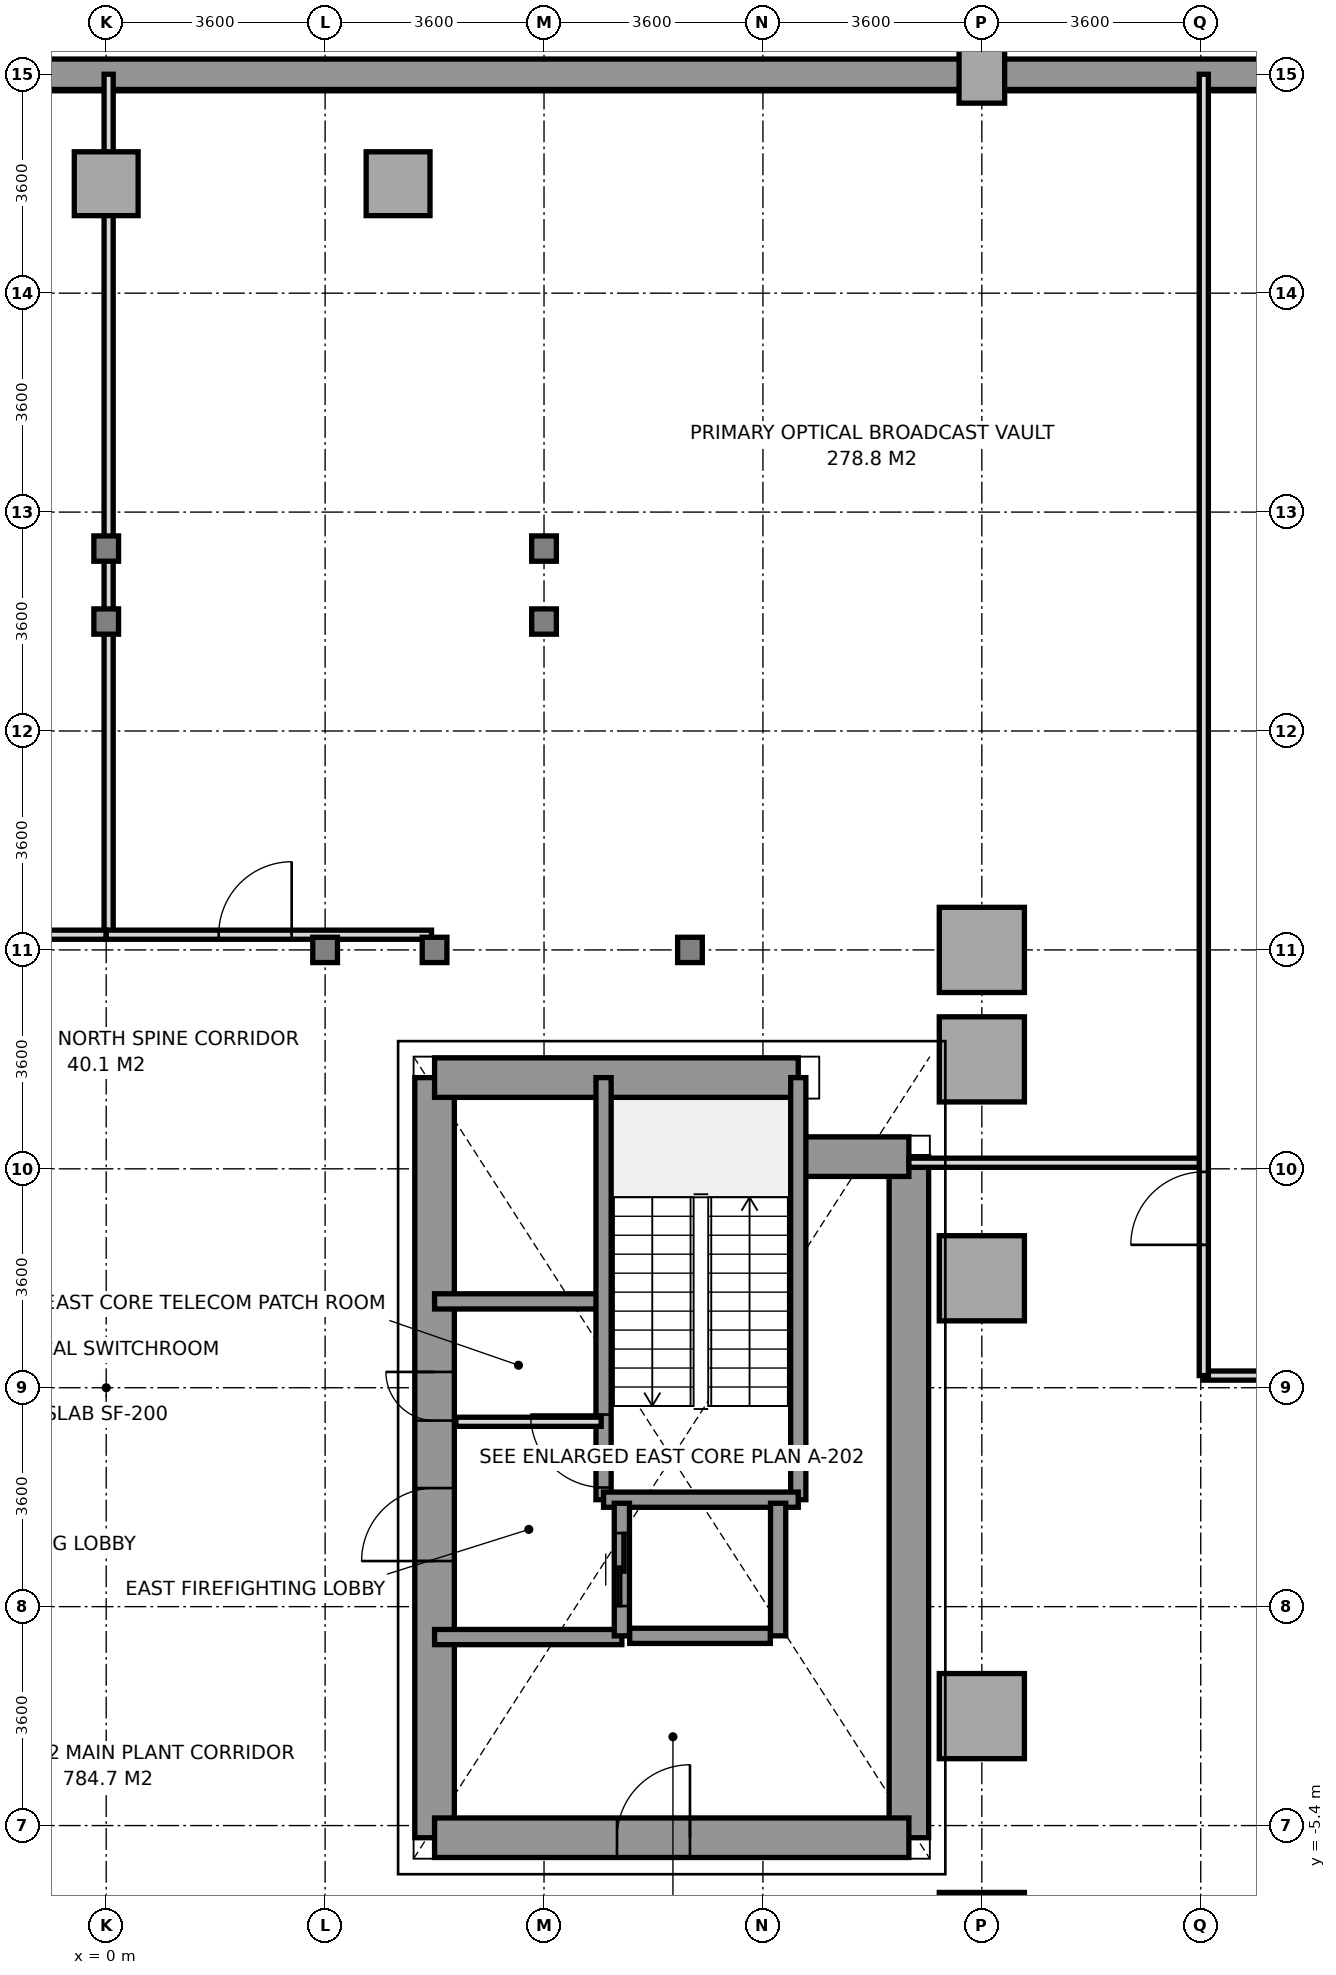
"""IFC4 building model, lengths in metres.
Left out: names, types, materials, properties, quantities, classifications, styles, units other than length and angle.
Written with IfcOpenShell. Run it as: python <this file> out.ifc"""

import sys

from ifc_helpers import new_model, si_unit, direction, frame, frame_2d, origin, origin_2d, place, context, subcontext, project, spatial, rectangle, i_section, extrude, source, transform, mapped, element, fill, save


model = new_model("IFC4")
c1 = context("Model", 3, precision=1e-05, world=origin(), true_north=direction((0.0, 1.0)))
c2 = subcontext(c1, "Body", "Model", "MODEL_VIEW")
j1 = project(units=[si_unit("LENGTHUNIT", "METRE"), si_unit("PLANEANGLEUNIT", "RADIAN")], contexts=[c1])
p1 = place(None, origin())
s1 = spatial("IfcSite", under=j1, at=p1, CompositionType="ELEMENT")
p2 = place(p1, origin())
s2 = spatial("IfcBuilding", under=s1, at=p2, CompositionType="ELEMENT")
p3 = place(p2, frame((0.0, 0.0, -8.4)))
s3 = spatial("IfcBuildingStorey", under=s2, at=p3, CompositionType="ELEMENT", Elevation=-8.4)
m1 = source(origin(), c2, "Body", "SweptSolid", [
    extrude(i_section(OverallWidth=0.406, OverallDepth=0.416, WebThickness=0.024, FlangeThickness=0.039, at=origin_2d()), origin(), (0.0, 0.0, 1.0), 4.12),
])
for number, where, z_axis, x_axis in (
    (1, (0.0, 14.4, -0.2), (0.0, 0.0, 1.0), (1.0, 0.0, 0.0)),
    (2, (0.0, 15.6, -0.2), (0.0, 0.0, 1.0), (1.0, 0.0, 0.0)),
):
    element("IfcColumn", number, at=place(p3, frame(where, z_axis=z_axis, x_axis=x_axis)), inside=s3, PredefinedType="COLUMN", context=c2, shape_type="MappedRepresentation", body=[
        mapped(m1, transform((0.0, 0.0, 0.0), x_axis=(1.0, 0.0, 0.0), y_axis=(0.0, 1.0, 0.0), z_axis=(0.0, 0.0, 1.0), scale=1.0)),
    ])
m2 = source(origin(), c2, "Body", "SweptSolid", [
    extrude(rectangle(XDim=1.05, YDim=1.05, at=origin_2d()), origin(), (0.0, 0.0, 1.0), 4.12),
])
p4 = place(p3, frame((0.0, 21.6, -0.2), z_axis=(0.0, 0.0, 1.0), x_axis=(1.0, 0.0, 0.0)))
e3 = element("IfcColumn", 3, at=p4, inside=s3, PredefinedType="COLUMN", context=c2, shape_type="MappedRepresentation", body=[
    mapped(m2, transform((0.0, 0.0, 0.0), x_axis=(1.0, 0.0, 0.0), y_axis=(0.0, 1.0, 0.0), z_axis=(0.0, 0.0, 1.0), scale=1.0)),
])
p5 = place(p3, frame((3.6, 9.0, -0.2), z_axis=(0.0, 0.0, 1.0), x_axis=(1.0, 0.0, 0.0)))
e4 = element("IfcColumn", 4, at=p5, inside=s3, PredefinedType="COLUMN", context=c2, shape_type="MappedRepresentation", body=[
    mapped(m1, transform((0.0, 0.0, 0.0), x_axis=(1.0, 0.0, 0.0), y_axis=(0.0, 1.0, 0.0), z_axis=(0.0, 0.0, 1.0), scale=1.0)),
])
p6 = place(p3, frame((4.8, 21.6, -0.2), z_axis=(0.0, 0.0, 1.0), x_axis=(1.0, 0.0, 0.0)))
e5 = element("IfcColumn", 5, at=p6, inside=s3, PredefinedType="COLUMN", context=c2, shape_type="MappedRepresentation", body=[
    mapped(m2, transform((0.0, 0.0, 0.0), x_axis=(1.0, 0.0, 0.0), y_axis=(0.0, 1.0, 0.0), z_axis=(0.0, 0.0, 1.0), scale=1.0)),
])
for number, where, z_axis, x_axis in (
    (6, (5.4, 9.0, -0.2), (0.0, 0.0, 1.0), (1.0, 0.0, 0.0)),
    (7, (7.2, 14.4, -0.2), (0.0, 0.0, 1.0), (1.0, 0.0, 0.0)),
    (8, (7.2, 15.6, -0.2), (0.0, 0.0, 1.0), (1.0, 0.0, 0.0)),
    (9, (9.6, 9.0, -0.2), (0.0, 0.0, 1.0), (1.0, 0.0, 0.0)),
):
    element("IfcColumn", number, at=place(p3, frame(where, z_axis=z_axis, x_axis=x_axis)), inside=s3, PredefinedType="COLUMN", context=c2, shape_type="MappedRepresentation", body=[
        mapped(m1, transform((0.0, 0.0, 0.0), x_axis=(1.0, 0.0, 0.0), y_axis=(0.0, 1.0, 0.0), z_axis=(0.0, 0.0, 1.0), scale=1.0)),
    ])
m3 = source(origin(), c2, "Body", "SweptSolid", [
    extrude(rectangle(XDim=1.4, YDim=1.4, at=origin_2d()), origin(), (0.0, 0.0, 1.0), 4.12),
])
for number, where, z_axis, x_axis in (
    (10, (14.4, -7.2, -0.2), (0.0, 0.0, 1.0), (1.0, 0.0, 0.0)),
    (11, (14.4, -3.6, -0.2), (0.0, 0.0, 1.0), (1.0, 0.0, 0.0)),
    (12, (14.4, 3.6, -0.2), (0.0, 0.0, 1.0), (1.0, 0.0, 0.0)),
    (13, (14.4, 7.2, -0.2), (0.0, 0.0, 1.0), (1.0, 0.0, 0.0)),
    (14, (14.4, 9.0, -0.2), (0.0, 0.0, 1.0), (1.0, 0.0, 0.0)),
):
    element("IfcColumn", number, at=place(p3, frame(where, z_axis=z_axis, x_axis=x_axis)), inside=s3, PredefinedType="COLUMN", context=c2, shape_type="MappedRepresentation", body=[
        mapped(m3, transform((0.0, 0.0, 0.0), x_axis=(1.0, 0.0, 0.0), y_axis=(0.0, 1.0, 0.0), z_axis=(0.0, 0.0, 1.0), scale=1.0)),
    ])
m4 = source(origin(), c2, "Body", "SweptSolid", [
    extrude(rectangle(XDim=0.75, YDim=0.95, at=origin_2d()), origin(), (0.0, 0.0, 1.0), 4.12),
])
p7 = place(p3, frame((14.4, 23.4, -0.2), z_axis=(0.0, 0.0, 1.0), x_axis=(1.0, 0.0, 0.0)))
e15 = element("IfcColumn", 15, at=p7, inside=s3, PredefinedType="COLUMN", context=c2, shape_type="MappedRepresentation", body=[
    mapped(m4, transform((0.0, 0.0, 0.0), x_axis=(1.0, 0.0, 0.0), y_axis=(0.0, 1.0, 0.0), z_axis=(0.0, 0.0, 1.0), scale=1.0)),
])
p8 = place(p3, frame((32.4, 23.4, -0.2), z_axis=(0.0, 0.0, 1.0), x_axis=(-1.0, 0.0, 0.0)))
e16 = element("IfcWall", 16, at=p8, inside=s3, PredefinedType="USERDEFINED", context=c2, shape_type="SweptSolid", body=[
    extrude(rectangle(XDim=64.8, YDim=0.5, at=frame_2d((32.4, 0.0))), origin(), (0.0, 0.0, 1.0), 4.12),
])
p9 = place(p3, frame((13.2, -5.6, -0.2), z_axis=(0.0, 0.0, 1.0), x_axis=(0.0, 1.0, 0.0)))
e17 = element("IfcWall", 17, at=p9, inside=s3, PredefinedType="SHEAR", context=c2, shape_type="SweptSolid", body=[
    extrude(rectangle(XDim=11.2, YDim=0.65, at=frame_2d((5.6, 0.0))), origin(), (0.0, 0.0, 1.0), 4.12),
])
p10 = place(p3, frame((5.4, -5.6, -0.2), z_axis=(0.0, 0.0, 1.0), x_axis=(0.0, 1.0, 0.0)))
e18 = element("IfcWall", 18, at=p10, inside=s3, PredefinedType="SHEAR", context=c2, shape_type="SweptSolid", body=[
    extrude(rectangle(XDim=12.5, YDim=0.65, at=frame_2d((6.25, 0.0))), origin(), (0.0, 0.0, 1.0), 4.12),
])
p11 = place(p10, frame((4.55, 0.0, 0.2)))
e19 = element("IfcOpeningElement", 19, at=p11, cuts=e18, PredefinedType="OPENING", context=c2, shape_type="SweptSolid", body=[
    extrude(rectangle(XDim=1.2, YDim=2.2, at=frame_2d((0.6, 1.1))), frame((0.0, 0.335, 0.0), z_axis=(0.0, -1.0, 0.0), x_axis=(1.0, 0.0, 0.0)), (0.0, 0.0, 1.0), 0.67),
])
p12 = place(p10, frame((6.86, 0.0, 0.2)))
e20 = element("IfcOpeningElement", 20, at=p12, cuts=e18, PredefinedType="OPENING", context=c2, shape_type="SweptSolid", body=[
    extrude(rectangle(XDim=0.8, YDim=2.1, at=frame_2d((0.4, 1.05))), frame((0.0, 0.335, 0.0), z_axis=(0.0, -1.0, 0.0), x_axis=(1.0, 0.0, 0.0)), (0.0, 0.0, 1.0), 0.67),
])
p13 = place(p3, frame((5.4, 6.9, -0.2), z_axis=(0.0, 0.0, 1.0), x_axis=(1.0, 0.0, 0.0)))
e21 = element("IfcWall", 21, at=p13, inside=s3, PredefinedType="SHEAR", context=c2, shape_type="SweptSolid", body=[
    extrude(rectangle(XDim=5.981, YDim=0.65, at=frame_2d((2.991, 0.0))), origin(), (0.0, 0.0, 1.0), 4.12),
])
p14 = place(p3, frame((11.381, 5.6, -0.2), z_axis=(0.0, 0.0, 1.0), x_axis=(1.0, 0.0, 0.0)))
e22 = element("IfcWall", 22, at=p14, inside=s3, PredefinedType="SHEAR", context=c2, shape_type="SweptSolid", body=[
    extrude(rectangle(XDim=1.819, YDim=0.65, at=frame_2d((0.909, 0.0))), origin(), (0.0, 0.0, 1.0), 4.12),
])
p15 = place(p3, frame((5.4, -5.6, -0.2), z_axis=(0.0, 0.0, 1.0), x_axis=(1.0, 0.0, 0.0)))
e23 = element("IfcWall", 23, at=p15, inside=s3, PredefinedType="SHEAR", context=c2, shape_type="SweptSolid", body=[
    extrude(rectangle(XDim=7.8, YDim=0.65, at=frame_2d((3.9, 0.0))), origin(), (0.0, 0.0, 1.0), 4.12),
])
p16 = place(p15, frame((3.0, 0.0, 0.2)))
e24 = element("IfcOpeningElement", 24, at=p16, cuts=e23, PredefinedType="OPENING", context=c2, shape_type="SweptSolid", body=[
    extrude(rectangle(XDim=1.2, YDim=2.2, at=frame_2d((0.6, 1.1))), frame((0.0, 0.335, 0.0), z_axis=(0.0, -1.0, 0.0), x_axis=(1.0, 0.0, 0.0)), (0.0, 0.0, 1.0), 0.67),
])
p17 = place(p3, frame((5.4, 3.22, -0.2), z_axis=(0.0, 0.0, 1.0), x_axis=(1.0, 0.0, 0.0)))
e25 = element("IfcWall", 25, at=p17, inside=s3, PredefinedType="SOLIDWALL", context=c2, shape_type="SweptSolid", body=[
    extrude(rectangle(XDim=2.78, YDim=0.25, at=frame_2d((1.39, 0.0))), origin(), (0.0, 0.0, 1.0), 4.12),
])
p18 = place(p3, frame((5.4, -2.3, -0.2), z_axis=(0.0, 0.0, 1.0), x_axis=(1.0, 0.0, 0.0)))
e26 = element("IfcWall", 26, at=p18, inside=s3, PredefinedType="SOLIDWALL", context=c2, shape_type="SweptSolid", body=[
    extrude(rectangle(XDim=3.08, YDim=0.25, at=frame_2d((1.54, 0.0))), origin(), (0.0, 0.0, 1.0), 4.12),
])
p19 = place(p3, frame((8.179, -0.041, -0.2), z_axis=(0.0, 0.0, 1.0), x_axis=(0.0, 1.0, 0.0)))
e27 = element("IfcWall", 27, at=p19, inside=s3, PredefinedType="SOLIDWALL", context=c2, shape_type="SweptSolid", body=[
    extrude(rectangle(XDim=6.941, YDim=0.25, at=frame_2d((3.47, 0.0))), origin(), (0.0, 0.0, 1.0), 4.12),
])
p20 = place(p19, frame((0.2, 0.0, 0.2)))
e28 = element("IfcOpeningElement", 28, at=p20, cuts=e27, PredefinedType="OPENING", context=c2, shape_type="SweptSolid", body=[
    extrude(rectangle(XDim=1.2, YDim=2.2, at=frame_2d((0.6, 1.1))), frame((0.0, 0.135, 0.0), z_axis=(0.0, -1.0, 0.0), x_axis=(1.0, 0.0, 0.0)), (0.0, 0.0, 1.0), 0.27),
])
p21 = place(p3, frame((11.381, -0.041, -0.2), z_axis=(0.0, 0.0, 1.0), x_axis=(0.0, 1.0, 0.0)))
e29 = element("IfcWall", 29, at=p21, inside=s3, PredefinedType="SOLIDWALL", context=c2, shape_type="SweptSolid", body=[
    extrude(rectangle(XDim=6.941, YDim=0.25, at=frame_2d((3.47, 0.0))), origin(), (0.0, 0.0, 1.0), 4.12),
])
p22 = place(p3, frame((8.179, -0.041, -0.2), z_axis=(0.0, 0.0, 1.0), x_axis=(1.0, 0.0, 0.0)))
e30 = element("IfcWall", 30, at=p22, inside=s3, PredefinedType="SOLIDWALL", context=c2, shape_type="SweptSolid", body=[
    extrude(rectangle(XDim=3.202, YDim=0.25, at=frame_2d((1.601, 0.0))), origin(), (0.0, 0.0, 1.0), 4.12),
])
p23 = place(p3, frame((8.48, -2.28, -0.2), z_axis=(0.0, 0.0, 1.0), x_axis=(0.0, 1.0, 0.0)))
e31 = element("IfcWall", 31, at=p23, inside=s3, PredefinedType="SOLIDWALL", context=c2, shape_type="SweptSolid", body=[
    extrude(rectangle(XDim=2.18, YDim=0.25, at=frame_2d((1.09, 0.0))), origin(), (0.0, 0.0, 1.0), 4.12),
])
p24 = place(p23, frame((0.49, 0.0, 0.2)))
e32 = element("IfcOpeningElement", 32, at=p24, cuts=e31, PredefinedType="OPENING", context=c2, shape_type="SweptSolid", body=[
    extrude(rectangle(XDim=1.2, YDim=2.2, at=frame_2d((0.6, 1.1))), frame((0.0, 0.135, 0.0), z_axis=(0.0, -1.0, 0.0), x_axis=(1.0, 0.0, 0.0)), (0.0, 0.0, 1.0), 0.27),
])
p25 = place(p3, frame((11.05, -2.28, -0.2), z_axis=(0.0, 0.0, 1.0), x_axis=(0.0, 1.0, 0.0)))
e33 = element("IfcWall", 33, at=p25, inside=s3, PredefinedType="SOLIDWALL", context=c2, shape_type="SweptSolid", body=[
    extrude(rectangle(XDim=2.18, YDim=0.25, at=frame_2d((1.09, 0.0))), origin(), (0.0, 0.0, 1.0), 4.12),
])
p26 = place(p3, frame((8.609, -2.28, -0.2), z_axis=(0.0, 0.0, 1.0), x_axis=(1.0, 0.0, 0.0)))
e34 = element("IfcWall", 34, at=p26, inside=s3, PredefinedType="SOLIDWALL", context=c2, shape_type="SweptSolid", body=[
    extrude(rectangle(XDim=2.312, YDim=0.25, at=frame_2d((1.156, 0.0))), origin(), (0.0, 0.0, 1.0), 4.12),
])
p27 = place(p3, frame((5.75, 1.24, 0.0), z_axis=(0.0, 0.0, 1.0), x_axis=(1.0, 0.0, 0.0)))
e35 = element("IfcWall", 35, at=p27, inside=s3, PredefinedType="PARTITIONING", context=c2, shape_type="SweptSolid", body=[
    extrude(rectangle(XDim=2.39, YDim=0.15, at=frame_2d((1.195, 0.0))), origin(), (0.0, 0.0, 1.0), 3.02),
])
p28 = place(p3, frame((13.2, 5.5, 0.0), z_axis=(0.0, 0.0, 1.0), x_axis=(1.0, 0.0, 0.0)))
e36 = element("IfcWall", 36, at=p28, inside=s3, PredefinedType="PARTITIONING", context=c2, shape_type="SweptSolid", body=[
    extrude(rectangle(XDim=4.85, YDim=0.15, at=frame_2d((2.425, 0.0))), origin(), (0.0, 0.0, 1.0), 3.33),
])
p29 = place(p3, frame((0.04, 9.25, 0.0), z_axis=(0.0, 0.0, 1.0), x_axis=(0.0, 1.0, 0.0)))
e37 = element("IfcWall", 37, at=p29, inside=s3, PredefinedType="PARTITIONING", context=c2, shape_type="SweptSolid", body=[
    extrude(rectangle(XDim=14.15, YDim=0.15, at=frame_2d((7.075, 0.0))), origin(), (0.0, 0.0, 1.0), 3.27),
])
p30 = place(p3, frame((18.05, 2.0, 0.0), z_axis=(0.0, 0.0, 1.0), x_axis=(1.0, 0.0, 0.0)))
e38 = element("IfcWall", 38, at=p30, inside=s3, PredefinedType="PARTITIONING", context=c2, shape_type="SweptSolid", body=[
    extrude(rectangle(XDim=14.35, YDim=0.15, at=frame_2d((7.175, 0.0))), origin(), (0.0, 0.0, 1.0), 3.33),
])
p31 = place(p3, frame((18.05, 2.0, 0.0), z_axis=(0.0, 0.0, 1.0), x_axis=(0.0, 1.0, 0.0)))
e39 = element("IfcWall", 39, at=p31, inside=s3, PredefinedType="PARTITIONING", context=c2, shape_type="SweptSolid", body=[
    extrude(rectangle(XDim=21.4, YDim=0.15, at=frame_2d((10.7, 0.0))), origin(), (0.0, 0.0, 1.0), 3.27),
])
p32 = place(p31, frame((2.15, 0.0, 0.0)))
e40 = element("IfcOpeningElement", 40, at=p32, cuts=e39, PredefinedType="OPENING", context=c2, shape_type="SweptSolid", body=[
    extrude(rectangle(XDim=1.2, YDim=2.2, at=frame_2d((0.6, 1.1))), frame((0.0, 0.085, 0.0), z_axis=(0.0, -1.0, 0.0), x_axis=(1.0, 0.0, 0.0)), (0.0, 0.0, 1.0), 0.17),
])
p33 = place(p3, frame((-5.35, 9.25, 0.0), z_axis=(0.0, 0.0, 1.0), x_axis=(1.0, 0.0, 0.0)))
e41 = element("IfcWall", 41, at=p33, inside=s3, PredefinedType="PARTITIONING", context=c2, shape_type="SweptSolid", body=[
    extrude(rectangle(XDim=5.35, YDim=0.15, at=frame_2d((2.675, 0.0))), origin(), (0.0, 0.0, 1.0), 3.92),
])
p34 = place(p33, frame((2.2, 0.0, 0.0)))
e42 = element("IfcOpeningElement", 42, at=p34, cuts=e41, PredefinedType="OPENING", context=c2, shape_type="SweptSolid", body=[
    extrude(rectangle(XDim=1.2, YDim=2.2, at=frame_2d((0.6, 1.1))), frame((0.0, 0.085, 0.0), z_axis=(0.0, -1.0, 0.0), x_axis=(1.0, 0.0, 0.0)), (0.0, 0.0, 1.0), 0.17),
])
p35 = place(p3, frame((0.0, 9.25, 0.0), z_axis=(0.0, 0.0, 1.0), x_axis=(1.0, 0.0, 0.0)))
e43 = element("IfcWall", 43, at=p35, inside=s3, PredefinedType="PARTITIONING", context=c2, shape_type="SweptSolid", body=[
    extrude(rectangle(XDim=5.35, YDim=0.15, at=frame_2d((2.675, 0.0))), origin(), (0.0, 0.0, 1.0), 3.92),
])
p36 = place(p35, frame((1.85, 0.0, 0.0)))
e44 = element("IfcOpeningElement", 44, at=p36, cuts=e43, PredefinedType="OPENING", context=c2, shape_type="SweptSolid", body=[
    extrude(rectangle(XDim=1.2, YDim=2.2, at=frame_2d((0.6, 1.1))), frame((0.0, 0.085, 0.0), z_axis=(0.0, -1.0, 0.0), x_axis=(1.0, 0.0, 0.0)), (0.0, 0.0, 1.0), 0.17),
])
m5 = source(origin(), c2, "Body", "SweptSolid", [
    extrude(rectangle(XDim=1.2, YDim=2.2, at=frame_2d((0.6, 1.1))), frame((0.0, 0.025, 0.0), z_axis=(0.0, -1.0, 0.0), x_axis=(1.0, 0.0, 0.0)), (0.0, 0.0, 1.0), 0.05),
])
p37 = place(p20, origin())
e45 = element("IfcDoor", 45, at=p37, inside=s3, OperationType="SINGLE_SWING_RIGHT", PredefinedType="DOOR", context=c2, shape_type="MappedRepresentation", body=[
    mapped(m5, transform((0.0, 0.0, 0.0), x_axis=(1.0, 0.0, 0.0), y_axis=(0.0, 1.0, 0.0), z_axis=(0.0, 0.0, 1.0), scale=1.0)),
])
fill(e28, e45)
p38 = place(p11, origin())
e46 = element("IfcDoor", 46, at=p38, inside=s3, OperationType="SINGLE_SWING_LEFT", PredefinedType="DOOR", context=c2, shape_type="MappedRepresentation", body=[
    mapped(m5, transform((0.0, 0.0, 0.0), x_axis=(1.0, 0.0, 0.0), y_axis=(0.0, 1.0, 0.0), z_axis=(0.0, 0.0, 1.0), scale=1.0)),
])
fill(e19, e46)
p39 = place(p16, origin())
e47 = element("IfcDoor", 47, at=p39, inside=s3, OperationType="SINGLE_SWING_RIGHT", PredefinedType="DOOR", context=c2, shape_type="MappedRepresentation", body=[
    mapped(m5, transform((0.0, 0.0, 0.0), x_axis=(1.0, 0.0, 0.0), y_axis=(0.0, 1.0, 0.0), z_axis=(0.0, 0.0, 1.0), scale=1.0)),
])
fill(e24, e47)
m6 = source(origin(), c2, "Body", "SweptSolid", [
    extrude(rectangle(XDim=0.8, YDim=2.1, at=frame_2d((0.4, 1.05))), frame((0.0, 0.025, 0.0), z_axis=(0.0, -1.0, 0.0), x_axis=(1.0, 0.0, 0.0)), (0.0, 0.0, 1.0), 0.05),
])
p40 = place(p12, origin())
e48 = element("IfcDoor", 48, at=p40, inside=s3, OperationType="SINGLE_SWING_RIGHT", PredefinedType="DOOR", context=c2, shape_type="MappedRepresentation", body=[
    mapped(m6, transform((0.0, 0.0, 0.0), x_axis=(1.0, 0.0, 0.0), y_axis=(0.0, 1.0, 0.0), z_axis=(0.0, 0.0, 1.0), scale=1.0)),
])
fill(e20, e48)
p41 = place(p24, origin())
e49 = element("IfcDoor", 49, at=p41, inside=s3, OperationType="SLIDING_TO_RIGHT", PredefinedType="DOOR", context=c2, shape_type="MappedRepresentation", body=[
    mapped(m5, transform((0.0, 0.0, 0.0), x_axis=(1.0, 0.0, 0.0), y_axis=(0.0, 1.0, 0.0), z_axis=(0.0, 0.0, 1.0), scale=1.0)),
])
fill(e32, e49)
p42 = place(p32, origin())
e50 = element("IfcDoor", 50, at=p42, inside=s3, OperationType="SINGLE_SWING_LEFT", PredefinedType="DOOR", context=c2, shape_type="MappedRepresentation", body=[
    mapped(m5, transform((0.0, 0.0, 0.0), x_axis=(1.0, 0.0, 0.0), y_axis=(0.0, 1.0, 0.0), z_axis=(0.0, 0.0, 1.0), scale=1.0)),
])
fill(e40, e50)
p43 = place(p36, origin())
e51 = element("IfcDoor", 51, at=p43, inside=s3, OperationType="SINGLE_SWING_RIGHT", PredefinedType="DOOR", context=c2, shape_type="MappedRepresentation", body=[
    mapped(m5, transform((0.0, 0.0, 0.0), x_axis=(1.0, 0.0, 0.0), y_axis=(0.0, 1.0, 0.0), z_axis=(0.0, 0.0, 1.0), scale=1.0)),
])
fill(e44, e51)
save(model, sys.argv[1])
